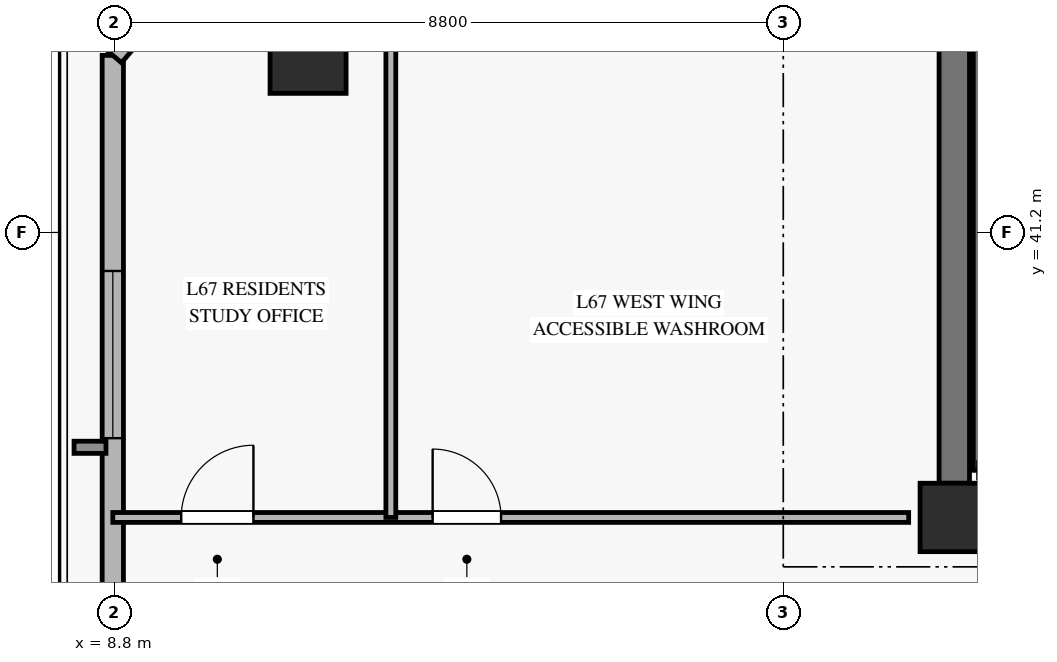
"""IFC4 building model, lengths in metres.
Left out: names, types, materials, properties, quantities, classifications, styles, units other than length and angle.
Written with IfcOpenShell. Run it as: python <this file> out.ifc"""

import sys

from ifc_helpers import new_model, si_unit, direction, frame, frame_2d, origin, origin_2d, place, context, subcontext, project, spatial, rectangle, hollow_rectangle, extrude, source, transform, mapped, element, fill, save


model = new_model("IFC4")
c1 = context("Model", 3, precision=1e-05, world=origin(), true_north=direction((0.0, 1.0)))
c2 = subcontext(c1, "Body", "Model", "MODEL_VIEW")
j1 = project(units=[si_unit("LENGTHUNIT", "METRE"), si_unit("PLANEANGLEUNIT", "RADIAN")], contexts=[c1])
p1 = place(None, origin())
s1 = spatial("IfcSite", under=j1, at=p1, CompositionType="ELEMENT")
p2 = place(p1, origin())
s2 = spatial("IfcBuilding", under=s1, at=p2, CompositionType="ELEMENT")
p3 = place(p2, frame((0.0, 0.0, 262.1)))
s3 = spatial("IfcBuildingStorey", under=s2, at=p3, CompositionType="ELEMENT", Elevation=262.1)
m1 = source(origin(), c2, "Body", "SweptSolid", [
    extrude(rectangle(XDim=0.9, YDim=0.9, at=origin_2d()), origin(), (0.0, 0.0, 1.0), 3.185),
])
p4 = place(p3, frame((19.85, 37.45, 0.0), z_axis=(0.0, 0.0, 1.0), x_axis=(1.0, 0.0, 0.0)))
e1 = element("IfcColumn", 1, at=p4, inside=s3, PredefinedType="PILASTER", context=c2, shape_type="MappedRepresentation", body=[
    mapped(m1, transform((0.0, 0.0, 0.0), x_axis=(1.0, 0.0, 0.0), y_axis=(0.0, 1.0, 0.0), z_axis=(0.0, 0.0, 1.0), scale=1.0)),
])
p5 = place(p3, frame((19.85, 37.9, 0.0), z_axis=(0.0, 0.0, 1.0), x_axis=(0.0, 1.0, 0.0)))
e2 = element("IfcWall", 2, at=p5, inside=s3, PredefinedType="SHEAR", context=c2, shape_type="SweptSolid", body=[
    extrude(rectangle(XDim=8.2, YDim=0.4, at=frame_2d((4.1, 0.0))), origin(), (0.0, 0.0, 1.0), 3.185),
])
m2 = source(origin(), c2, "Body", "SweptSolid", [
    extrude(hollow_rectangle(XDim=1.0, YDim=1.0, WallThickness=0.045, at=origin_2d()), origin(), (0.0, 0.0, 1.0), 3.185),
])
p6 = place(p3, frame((11.348, 43.53, 0.0), z_axis=(0.0, 0.0, 1.0), x_axis=(1.0, 0.0, 0.0)))
e3 = element("IfcColumn", 3, at=p6, inside=s3, PredefinedType="COLUMN", context=c2, shape_type="MappedRepresentation", body=[
    mapped(m2, transform((0.0, 0.0, 0.0), x_axis=(1.0, 0.0, 0.0), y_axis=(0.0, 1.0, 0.0), z_axis=(0.0, 0.0, 1.0), scale=1.0)),
])
p7 = place(p3, frame((8.779, 31.322, 0.0), z_axis=(0.0, 0.0, 1.0), x_axis=(0.0, 1.0, 0.0)))
e4 = element("IfcWall", 4, at=p7, inside=s3, PredefinedType="SOLIDWALL", context=c2, shape_type="SweptSolid", body=[
    extrude(rectangle(XDim=12.208, YDim=0.28, at=frame_2d((6.104, 0.0))), origin(), (0.0, 0.0, 1.0), 2.815),
])
p8 = place(p7, frame((7.171, 0.0, 0.45)))
e5 = element("IfcOpeningElement", 5, at=p8, cuts=e4, PredefinedType="OPENING", context=c2, shape_type="SweptSolid", body=[
    extrude(rectangle(XDim=2.2, YDim=2.1, at=frame_2d((1.1, 1.05))), frame((0.0, 0.15, 0.0), z_axis=(0.0, -1.0, 0.0), x_axis=(1.0, 0.0, 0.0)), (0.0, 0.0, 1.0), 0.3),
])
p9 = place(p3, frame((11.098, 46.25, 0.0), z_axis=(0.0, 0.0, 1.0), x_axis=(-0.648764006605, -0.760989660727, 0.0)))
e6 = element("IfcWall", 6, at=p9, inside=s3, PredefinedType="SOLIDWALL", context=c2, shape_type="SweptSolid", body=[
    extrude(rectangle(XDim=3.574, YDim=0.3, at=frame_2d((1.787, 0.0))), origin(), (0.0, 0.0, 1.0), 2.815),
])
p10 = place(p9, frame((0.987, 0.0, 0.45)))
e7 = element("IfcOpeningElement", 7, at=p10, cuts=e6, PredefinedType="OPENING", context=c2, shape_type="SweptSolid", body=[
    extrude(rectangle(XDim=1.6, YDim=2.0, at=frame_2d((0.8, 1.0))), frame((0.0, 0.16, 0.0), z_axis=(0.0, -1.0, 0.0), x_axis=(1.0, 0.0, 0.0)), (0.0, 0.0, 1.0), 0.32),
])
p11 = place(p3, frame((20.17, 38.07, 0.0), z_axis=(0.0, 0.0, 1.0), x_axis=(0.0, 1.0, 0.0)))
e8 = element("IfcWall", 8, at=p11, inside=s3, PredefinedType="SOLIDWALL", context=c2, shape_type="SweptSolid", body=[
    extrude(rectangle(XDim=7.25, YDim=0.14, at=frame_2d((3.625, 0.0))), origin(), (0.0, 0.0, 1.0), 3.4),
])
p12 = place(p3, frame((8.779, 37.45, 0.0), z_axis=(0.0, 0.0, 1.0), x_axis=(1.0, 0.0, 0.0)))
e9 = element("IfcWall", 9, at=p12, inside=s3, PredefinedType="PARTITIONING", context=c2, shape_type="SweptSolid", body=[
    extrude(rectangle(XDim=10.471, YDim=0.13, at=frame_2d((5.235, 0.0))), origin(), (0.0, 0.0, 1.0), 2.82),
])
p13 = place(p12, frame((0.9, 0.0, 0.0)))
e10 = element("IfcOpeningElement", 10, at=p13, cuts=e9, PredefinedType="OPENING", context=c2, shape_type="SweptSolid", body=[
    extrude(rectangle(XDim=0.95, YDim=2.1, at=frame_2d((0.475, 1.05))), frame((0.0, 0.075, 0.0), z_axis=(0.0, -1.0, 0.0), x_axis=(1.0, 0.0, 0.0)), (0.0, 0.0, 1.0), 0.15),
])
p14 = place(p12, frame((4.208, 0.0, 0.0)))
e11 = element("IfcOpeningElement", 11, at=p14, cuts=e9, PredefinedType="OPENING", context=c2, shape_type="SweptSolid", body=[
    extrude(rectangle(XDim=0.9, YDim=2.1, at=frame_2d((0.45, 1.05))), frame((0.0, 0.075, 0.0), z_axis=(0.0, -1.0, 0.0), x_axis=(1.0, 0.0, 0.0)), (0.0, 0.0, 1.0), 0.15),
])
p15 = place(p3, frame((12.437, 37.45, 0.0), z_axis=(0.0, 0.0, 1.0), x_axis=(0.0, 1.0, 0.0)))
e12 = element("IfcWall", 12, at=p15, inside=s3, PredefinedType="PARTITIONING", context=c2, shape_type="SweptSolid", body=[
    extrude(rectangle(XDim=8.8, YDim=0.13, at=frame_2d((4.4, 0.0))), origin(), (0.0, 0.0, 1.0), 3.185),
])
m3 = source(origin(), c2, "Body", "SweptSolid", [
    extrude(rectangle(XDim=2.2, YDim=2.1, at=frame_2d((1.1, 1.05))), frame((0.0, 0.03, 0.0), z_axis=(0.0, -1.0, 0.0), x_axis=(1.0, 0.0, 0.0)), (0.0, 0.0, 1.0), 0.06),
])
p16 = place(p8, origin())
e13 = element("IfcWindow", 13, at=p16, inside=s3, PartitioningType="SINGLE_PANEL", PredefinedType="WINDOW", context=c2, shape_type="MappedRepresentation", body=[
    mapped(m3, transform((0.0, 0.0, 0.0), x_axis=(1.0, 0.0, 0.0), y_axis=(0.0, 1.0, 0.0), z_axis=(0.0, 0.0, 1.0), scale=1.0)),
])
fill(e5, e13)
m4 = source(origin(), c2, "Body", "SweptSolid", [
    extrude(rectangle(XDim=0.95, YDim=2.1, at=frame_2d((0.475, 1.05))), frame((0.0, 0.025, 0.0), z_axis=(0.0, -1.0, 0.0), x_axis=(1.0, 0.0, 0.0)), (0.0, 0.0, 1.0), 0.05),
])
p17 = place(p13, origin())
e14 = element("IfcDoor", 14, at=p17, inside=s3, OperationType="SINGLE_SWING_RIGHT", PredefinedType="DOOR", context=c2, shape_type="MappedRepresentation", body=[
    mapped(m4, transform((0.0, 0.0, 0.0), x_axis=(1.0, 0.0, 0.0), y_axis=(0.0, 1.0, 0.0), z_axis=(0.0, 0.0, 1.0), scale=1.0)),
])
fill(e10, e14)
m5 = source(origin(), c2, "Body", "SweptSolid", [
    extrude(rectangle(XDim=0.9, YDim=2.1, at=frame_2d((0.45, 1.05))), frame((0.0, 0.025, 0.0), z_axis=(0.0, -1.0, 0.0), x_axis=(1.0, 0.0, 0.0)), (0.0, 0.0, 1.0), 0.05),
])
p18 = place(p14, origin())
e15 = element("IfcDoor", 15, at=p18, inside=s3, OperationType="SINGLE_SWING_LEFT", PredefinedType="DOOR", context=c2, shape_type="MappedRepresentation", body=[
    mapped(m5, transform((0.0, 0.0, 0.0), x_axis=(1.0, 0.0, 0.0), y_axis=(0.0, 1.0, 0.0), z_axis=(0.0, 0.0, 1.0), scale=1.0)),
])
fill(e11, e15)
save(model, sys.argv[1])
